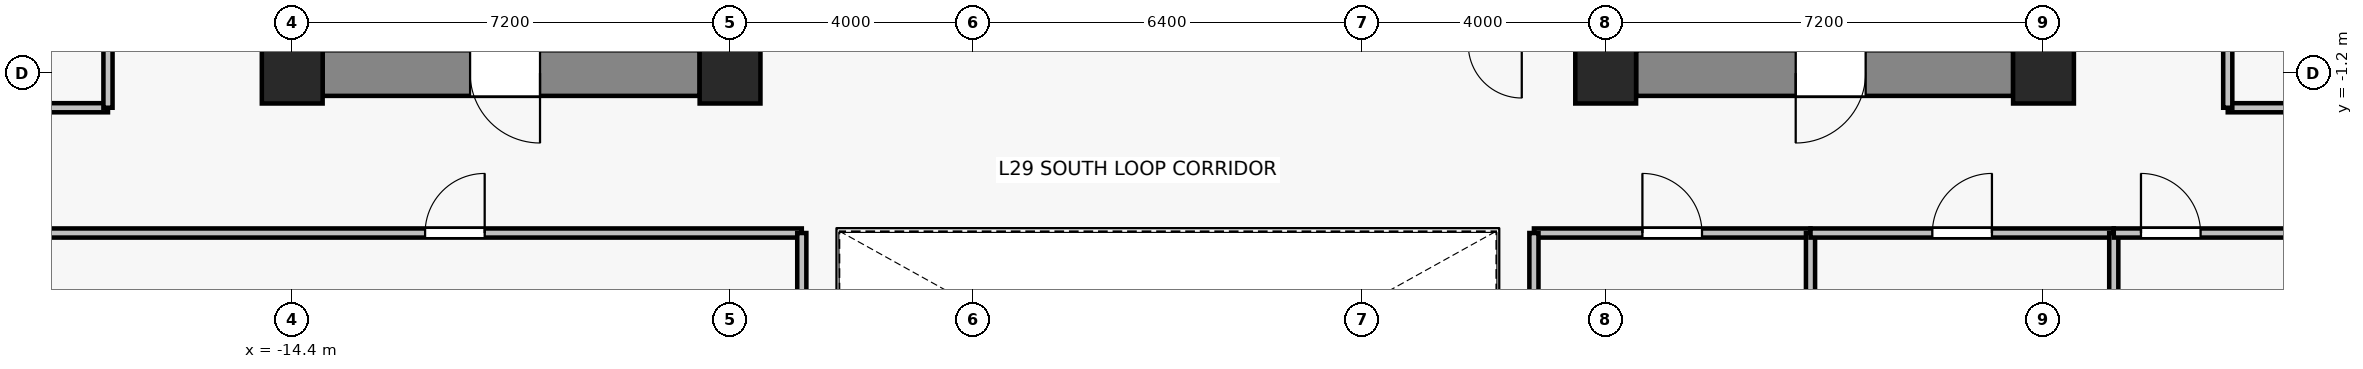
"""IFC4 building model, lengths in metres.
Left out: names, types, materials, properties, quantities, classifications, styles, units other than length and angle.
Written with IfcOpenShell. Run it as: python <this file> out.ifc"""

import sys

from ifc_helpers import new_model, si_unit, direction, frame, frame_2d, origin, origin_2d, place, context, subcontext, project, spatial, rectangle, extrude, source, transform, mapped, element, fill, save


model = new_model("IFC4")
c1 = context("Model", 3, precision=1e-05, world=origin(), true_north=direction((0.0, 1.0)))
c2 = subcontext(c1, "Body", "Model", "MODEL_VIEW")
j1 = project(units=[si_unit("LENGTHUNIT", "METRE"), si_unit("PLANEANGLEUNIT", "RADIAN")], contexts=[c1])
p1 = place(None, origin())
s1 = spatial("IfcSite", under=j1, at=p1, CompositionType="ELEMENT")
p2 = place(p1, origin())
s2 = spatial("IfcBuilding", under=s1, at=p2, CompositionType="ELEMENT")
p3 = place(p2, frame((0.0, 0.0, 106.6)))
s3 = spatial("IfcBuildingStorey", under=s2, at=p3, CompositionType="ELEMENT", Elevation=106.6)
for number, where, z_axis, x_axis in (
    (1, (-14.4, -1.2, 0.0), (0.0, 0.0, 1.0), (1.0, 0.0, 0.0)),
    (2, (-7.2, -1.2, 0.0), (0.0, 0.0, 1.0), (1.0, 0.0, 0.0)),
    (3, (7.2, -1.2, 0.0), (0.0, 0.0, 1.0), (1.0, 0.0, 0.0)),
    (4, (14.4, -1.2, 0.0), (0.0, 0.0, 1.0), (1.0, 0.0, 0.0)),
):
    element("IfcColumn", number, at=place(p3, frame(where, z_axis=z_axis, x_axis=x_axis)), inside=s3, PredefinedType="COLUMN", context=c2, shape_type="SweptSolid", body=[
        extrude(rectangle(XDim=1.0, YDim=1.0, at=origin_2d()), origin(), (0.0, 0.0, 1.0), 3.3),
    ])
p4 = place(p3, frame((-7.7, -1.2, 0.0), z_axis=(0.0, 0.0, 1.0), x_axis=(-1.0, 0.0, 0.0)))
e5 = element("IfcWall", 5, at=p4, inside=s3, PredefinedType="SHEAR", context=c2, shape_type="SweptSolid", body=[
    extrude(rectangle(XDim=6.2, YDim=0.75, at=frame_2d((3.1, 0.0))), origin(), (0.0, 0.0, 1.0), 3.075),
])
p5 = place(p4, frame((2.625, 0.0, 0.0)))
e6 = element("IfcOpeningElement", 6, at=p5, cuts=e5, PredefinedType="OPENING", context=c2, shape_type="SweptSolid", body=[
    extrude(rectangle(XDim=1.15, YDim=2.15, at=frame_2d((0.575, 1.075))), frame((0.0, 0.385, 0.0), z_axis=(0.0, -1.0, 0.0), x_axis=(1.0, 0.0, 0.0)), (0.0, 0.0, 1.0), 0.77),
])
p6 = place(p3, frame((13.9, -1.2, 0.0), z_axis=(0.0, 0.0, 1.0), x_axis=(-1.0, 0.0, 0.0)))
e7 = element("IfcWall", 7, at=p6, inside=s3, PredefinedType="SHEAR", context=c2, shape_type="SweptSolid", body=[
    extrude(rectangle(XDim=6.2, YDim=0.75, at=frame_2d((3.1, 0.0))), origin(), (0.0, 0.0, 1.0), 3.075),
])
p7 = place(p6, frame((2.425, 0.0, 0.0)))
e8 = element("IfcOpeningElement", 8, at=p7, cuts=e7, PredefinedType="OPENING", context=c2, shape_type="SweptSolid", body=[
    extrude(rectangle(XDim=1.15, YDim=2.15, at=frame_2d((0.575, 1.075))), frame((0.0, 0.385, 0.0), z_axis=(0.0, -1.0, 0.0), x_axis=(1.0, 0.0, 0.0)), (0.0, 0.0, 1.0), 0.77),
])
p8 = place(p3, frame((-29.53, -3.83, 0.0), z_axis=(0.0, 0.0, 1.0), x_axis=(1.0, 0.0, 0.0)))
e9 = element("IfcWall", 9, at=p8, inside=s3, PredefinedType="PARTITIONING", context=c2, shape_type="SweptSolid", body=[
    extrude(rectangle(XDim=23.51, YDim=0.15, at=frame_2d((11.755, 0.0))), origin(), (0.0, 0.0, 1.0), 2.515),
])
p9 = place(p8, frame((17.315, 0.0, 0.0)))
e10 = element("IfcOpeningElement", 10, at=p9, cuts=e9, PredefinedType="OPENING", context=c2, shape_type="SweptSolid", body=[
    extrude(rectangle(XDim=0.98, YDim=2.15, at=frame_2d((0.49, 1.075))), frame((0.0, 0.085, 0.0), z_axis=(0.0, -1.0, 0.0), x_axis=(1.0, 0.0, 0.0)), (0.0, 0.0, 1.0), 0.17),
])
p10 = place(p3, frame((-6.02, -3.83, 0.0), z_axis=(0.0, 0.0, 1.0), x_axis=(0.0, -1.0, 0.0)))
e11 = element("IfcWall", 11, at=p10, inside=s3, PredefinedType="PARTITIONING", context=c2, shape_type="SweptSolid", body=[
    extrude(rectangle(XDim=13.8, YDim=0.15, at=frame_2d((6.9, 0.0))), origin(), (0.0, 0.0, 1.0), 2.515),
])
p11 = place(p3, frame((6.02, -3.83, 0.0), z_axis=(0.0, 0.0, 1.0), x_axis=(1.0, 0.0, 0.0)))
e12 = element("IfcWall", 12, at=p11, inside=s3, PredefinedType="PARTITIONING", context=c2, shape_type="SweptSolid", body=[
    extrude(rectangle(XDim=4.548, YDim=0.15, at=frame_2d((2.274, 0.0))), origin(), (0.0, 0.0, 1.0), 2.515),
])
p12 = place(p11, frame((1.784, 0.0, 0.0)))
e13 = element("IfcOpeningElement", 13, at=p12, cuts=e12, PredefinedType="OPENING", context=c2, shape_type="SweptSolid", body=[
    extrude(rectangle(XDim=0.98, YDim=2.15, at=frame_2d((0.49, 1.075))), frame((0.0, 0.085, 0.0), z_axis=(0.0, -1.0, 0.0), x_axis=(1.0, 0.0, 0.0)), (0.0, 0.0, 1.0), 0.17),
])
for number, where, z_axis, x_axis in (
    (14, (6.02, -17.63, 0.0), (0.0, 0.0, 1.0), (0.0, 1.0, 0.0)),
    (15, (10.568, -3.83, 0.0), (0.0, 0.0, 1.0), (0.0, -1.0, 0.0)),
):
    element("IfcWall", number, at=place(p3, frame(where, z_axis=z_axis, x_axis=x_axis)), inside=s3, PredefinedType="PARTITIONING", context=c2, shape_type="SweptSolid", body=[
        extrude(rectangle(XDim=13.8, YDim=0.15, at=frame_2d((6.9, 0.0))), origin(), (0.0, 0.0, 1.0), 2.515),
    ])
p13 = place(p3, frame((10.568, -3.83, 0.0), z_axis=(0.0, 0.0, 1.0), x_axis=(1.0, 0.0, 0.0)))
e16 = element("IfcWall", 16, at=p13, inside=s3, PredefinedType="PARTITIONING", context=c2, shape_type="SweptSolid", body=[
    extrude(rectangle(XDim=4.987, YDim=0.15, at=frame_2d((2.494, 0.0))), origin(), (0.0, 0.0, 1.0), 2.515),
])
p14 = place(p13, frame((2.004, 0.0, 0.0)))
e17 = element("IfcOpeningElement", 17, at=p14, cuts=e16, PredefinedType="OPENING", context=c2, shape_type="SweptSolid", body=[
    extrude(rectangle(XDim=0.98, YDim=2.15, at=frame_2d((0.49, 1.075))), frame((0.0, 0.085, 0.0), z_axis=(0.0, -1.0, 0.0), x_axis=(1.0, 0.0, 0.0)), (0.0, 0.0, 1.0), 0.17),
])
p15 = place(p3, frame((15.556, -3.83, 0.0), z_axis=(0.0, 0.0, 1.0), x_axis=(0.0, -1.0, 0.0)))
e18 = element("IfcWall", 18, at=p15, inside=s3, PredefinedType="PARTITIONING", context=c2, shape_type="SweptSolid", body=[
    extrude(rectangle(XDim=13.8, YDim=0.15, at=frame_2d((6.9, 0.0))), origin(), (0.0, 0.0, 1.0), 2.515),
])
p16 = place(p3, frame((15.556, -3.83, 0.0), z_axis=(0.0, 0.0, 1.0), x_axis=(1.0, 0.0, 0.0)))
e19 = element("IfcWall", 19, at=p16, inside=s3, PredefinedType="PARTITIONING", context=c2, shape_type="SweptSolid", body=[
    extrude(rectangle(XDim=5.426, YDim=0.15, at=frame_2d((2.713, 0.0))), origin(), (0.0, 0.0, 1.0), 3.075),
])
p17 = place(p16, frame((0.448, 0.0, 0.0)))
e20 = element("IfcOpeningElement", 20, at=p17, cuts=e19, PredefinedType="OPENING", context=c2, shape_type="SweptSolid", body=[
    extrude(rectangle(XDim=0.98, YDim=2.15, at=frame_2d((0.49, 1.075))), frame((0.0, 0.085, 0.0), z_axis=(0.0, -1.0, 0.0), x_axis=(1.0, 0.0, 0.0)), (0.0, 0.0, 1.0), 0.17),
])
p18 = place(p3, frame((-17.43, -1.77, 0.0), z_axis=(0.0, 0.0, 1.0), x_axis=(-1.0, 0.0, 0.0)))
e21 = element("IfcWall", 21, at=p18, inside=s3, PredefinedType="PARTITIONING", context=c2, shape_type="SweptSolid", body=[
    extrude(rectangle(XDim=12.1, YDim=0.15, at=frame_2d((6.05, 0.0))), origin(), (0.0, 0.0, 1.0), 2.515),
])
p19 = place(p3, frame((-17.43, 2.987, 0.0), z_axis=(0.0, 0.0, 1.0), x_axis=(0.0, -1.0, 0.0)))
e22 = element("IfcWall", 22, at=p19, inside=s3, PredefinedType="PARTITIONING", context=c2, shape_type="SweptSolid", body=[
    extrude(rectangle(XDim=4.757, YDim=0.15, at=frame_2d((2.378, 0.0))), origin(), (0.0, 0.0, 1.0), 2.515),
])
p20 = place(p19, frame((1.888, 0.0, 0.0)))
e23 = element("IfcOpeningElement", 23, at=p20, cuts=e22, PredefinedType="OPENING", context=c2, shape_type="SweptSolid", body=[
    extrude(rectangle(XDim=0.98, YDim=2.15, at=frame_2d((0.49, 1.075))), frame((0.0, 0.085, 0.0), z_axis=(0.0, -1.0, 0.0), x_axis=(1.0, 0.0, 0.0)), (0.0, 0.0, 1.0), 0.17),
])
p21 = place(p3, frame((25.53, -1.77, 0.0), z_axis=(0.0, 0.0, 1.0), x_axis=(-1.0, 0.0, 0.0)))
e24 = element("IfcWall", 24, at=p21, inside=s3, PredefinedType="PARTITIONING", context=c2, shape_type="SweptSolid", body=[
    extrude(rectangle(XDim=8.1, YDim=0.15, at=frame_2d((4.05, 0.0))), origin(), (0.0, 0.0, 1.0), 2.515),
])
p22 = place(p3, frame((17.43, -1.77, 0.0), z_axis=(0.0, 0.0, 1.0), x_axis=(0.0, 1.0, 0.0)))
e25 = element("IfcWall", 25, at=p22, inside=s3, PredefinedType="PARTITIONING", context=c2, shape_type="SweptSolid", body=[
    extrude(rectangle(XDim=15.65, YDim=0.15, at=frame_2d((7.825, 0.0))), origin(), (0.0, 0.0, 1.0), 2.515),
])
p23 = place(p22, frame((7.335, 0.0, 0.0)))
e26 = element("IfcOpeningElement", 26, at=p23, cuts=e25, PredefinedType="OPENING", context=c2, shape_type="SweptSolid", body=[
    extrude(rectangle(XDim=0.98, YDim=2.15, at=frame_2d((0.49, 1.075))), frame((0.0, 0.085, 0.0), z_axis=(0.0, -1.0, 0.0), x_axis=(1.0, 0.0, 0.0)), (0.0, 0.0, 1.0), 0.17),
])
m1 = source(origin(), c2, "Body", "SweptSolid", [
    extrude(rectangle(XDim=1.15, YDim=2.15, at=frame_2d((0.575, 1.075))), frame((0.0, 0.025, 0.0), z_axis=(0.0, -1.0, 0.0), x_axis=(1.0, 0.0, 0.0)), (0.0, 0.0, 1.0), 0.05),
])
p24 = place(p5, origin())
e27 = element("IfcDoor", 27, at=p24, inside=s3, OperationType="SINGLE_SWING_LEFT", PredefinedType="DOOR", context=c2, shape_type="MappedRepresentation", body=[
    mapped(m1, transform((0.0, 0.0, 0.0), x_axis=(1.0, 0.0, 0.0), y_axis=(0.0, 1.0, 0.0), z_axis=(0.0, 0.0, 1.0), scale=1.0)),
])
fill(e6, e27)
p25 = place(p7, origin())
e28 = element("IfcDoor", 28, at=p25, inside=s3, OperationType="SINGLE_SWING_RIGHT", PredefinedType="DOOR", context=c2, shape_type="MappedRepresentation", body=[
    mapped(m1, transform((0.0, 0.0, 0.0), x_axis=(1.0, 0.0, 0.0), y_axis=(0.0, 1.0, 0.0), z_axis=(0.0, 0.0, 1.0), scale=1.0)),
])
fill(e8, e28)
m2 = source(origin(), c2, "Body", "SweptSolid", [
    extrude(rectangle(XDim=0.98, YDim=2.15, at=frame_2d((0.49, 1.075))), frame((0.0, 0.025, 0.0), z_axis=(0.0, -1.0, 0.0), x_axis=(1.0, 0.0, 0.0)), (0.0, 0.0, 1.0), 0.05),
])
p26 = place(p9, origin())
e29 = element("IfcDoor", 29, at=p26, inside=s3, OperationType="SINGLE_SWING_RIGHT", PredefinedType="DOOR", context=c2, shape_type="MappedRepresentation", body=[
    mapped(m2, transform((0.0, 0.0, 0.0), x_axis=(1.0, 0.0, 0.0), y_axis=(0.0, 1.0, 0.0), z_axis=(0.0, 0.0, 1.0), scale=1.0)),
])
fill(e10, e29)
p27 = place(p12, origin())
e30 = element("IfcDoor", 30, at=p27, inside=s3, OperationType="SINGLE_SWING_LEFT", PredefinedType="DOOR", context=c2, shape_type="MappedRepresentation", body=[
    mapped(m2, transform((0.0, 0.0, 0.0), x_axis=(1.0, 0.0, 0.0), y_axis=(0.0, 1.0, 0.0), z_axis=(0.0, 0.0, 1.0), scale=1.0)),
])
fill(e13, e30)
p28 = place(p14, origin())
e31 = element("IfcDoor", 31, at=p28, inside=s3, OperationType="SINGLE_SWING_RIGHT", PredefinedType="DOOR", context=c2, shape_type="MappedRepresentation", body=[
    mapped(m2, transform((0.0, 0.0, 0.0), x_axis=(1.0, 0.0, 0.0), y_axis=(0.0, 1.0, 0.0), z_axis=(0.0, 0.0, 1.0), scale=1.0)),
])
fill(e17, e31)
p29 = place(p17, origin())
e32 = element("IfcDoor", 32, at=p29, inside=s3, OperationType="SINGLE_SWING_LEFT", PredefinedType="DOOR", context=c2, shape_type="MappedRepresentation", body=[
    mapped(m2, transform((0.0, 0.0, 0.0), x_axis=(1.0, 0.0, 0.0), y_axis=(0.0, 1.0, 0.0), z_axis=(0.0, 0.0, 1.0), scale=1.0)),
])
fill(e20, e32)
save(model, sys.argv[1])
